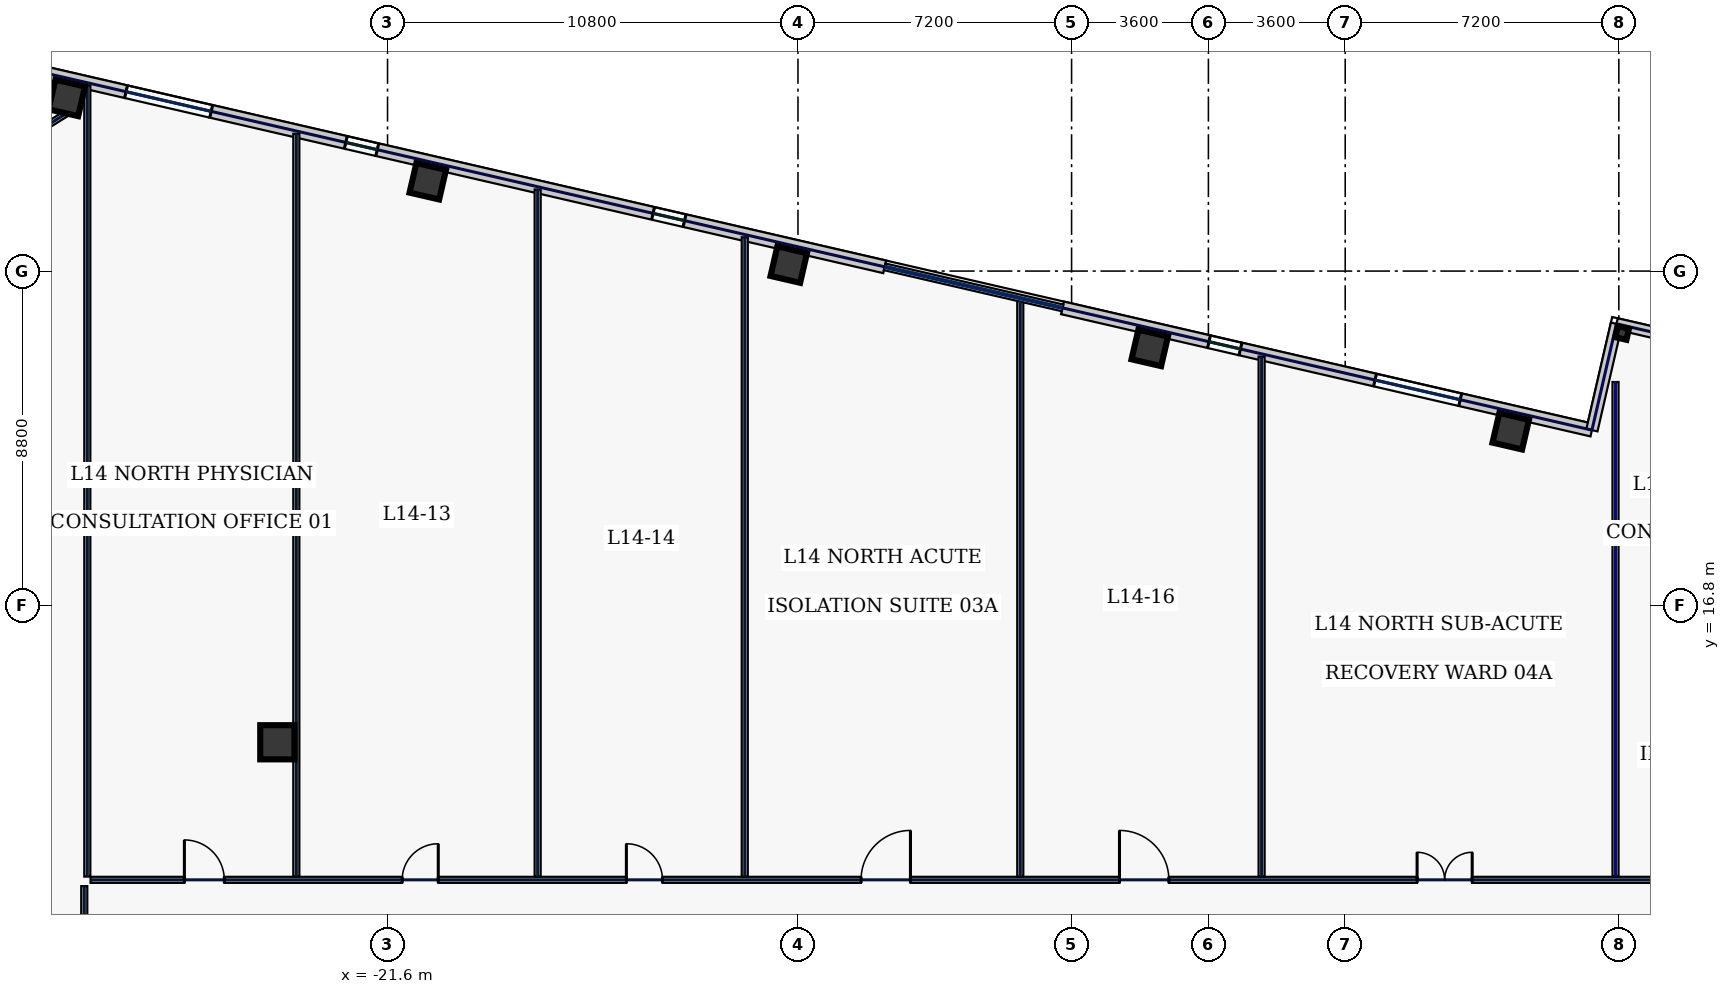
"""IFC4 building model, lengths in metres.
Left out: names, types, materials, properties, quantities, classifications, styles, units other than length and angle.
Written with IfcOpenShell. Run it as: python <this file> out.ifc"""

import sys

from ifc_helpers import new_model, si_unit, direction, frame, frame_2d, origin, origin_2d, place, context, subcontext, project, spatial, rectangle, hollow_rectangle, extrude, element, fill, save


model = new_model("IFC4")
c1 = context("Model", 3, precision=1e-05, world=origin(), true_north=direction((0.0, 1.0)))
c2 = subcontext(c1, "Body", "Model", "MODEL_VIEW")
j1 = project(units=[si_unit("LENGTHUNIT", "METRE"), si_unit("PLANEANGLEUNIT", "RADIAN")], contexts=[c1])
p1 = place(None, origin())
s1 = spatial("IfcSite", under=j1, at=p1, CompositionType="ELEMENT")
p2 = place(p1, origin())
s2 = spatial("IfcBuilding", under=s1, at=p2, CompositionType="ELEMENT")
p3 = place(p2, frame((0.0, 0.0, 67.4)))
s3 = spatial("IfcBuildingStorey", under=s2, at=p3, CompositionType="ELEMENT", Elevation=67.4)
p4 = place(p3, frame((-24.5, 13.2, 0.0), z_axis=(0.0, 0.0, 1.0), x_axis=(1.0, 0.0, 0.0)))
e1 = element("IfcColumn", 1, at=p4, inside=s3, PredefinedType="COLUMN", context=c2, shape_type="SweptSolid", body=[
    extrude(hollow_rectangle(XDim=0.9, YDim=0.9, WallThickness=0.04, at=origin_2d()), origin(), (0.0, 0.0, 1.0), 3.74),
])
for number, where, z_axis, x_axis in (
    (2, (7.955, 21.385, 0.0), (0.0, 0.0, 1.0), (0.974, -0.225, 0.0)),
    (3, (-1.544, 23.578, 0.0), (0.0, 0.0, 1.0), (0.974, -0.225, 0.0)),
    (4, (-11.042, 25.771, 0.0), (0.0, 0.0, 1.0), (0.974, -0.225, 0.0)),
    (5, (-20.541, 27.964, 0.0), (0.0, 0.0, 1.0), (0.974, -0.225, 0.0)),
    (6, (-30.04, 30.156, 0.0), (0.0, 0.0, 1.0), (0.974, -0.225, 0.0)),
):
    element("IfcColumn", number, at=place(p3, frame(where, z_axis=z_axis, x_axis=x_axis)), inside=s3, PredefinedType="COLUMN", context=c2, shape_type="SweptSolid", body=[
        extrude(hollow_rectangle(XDim=0.8, YDim=0.8, WallThickness=0.036, at=origin_2d()), origin(), (0.0, 0.0, 1.0), 3.74),
    ])
p5 = place(p3, frame((10.888, 23.971, 0.0), z_axis=(0.0, 0.0, 1.0), x_axis=(0.974370064785, -0.224951054344, 0.0)))
e7 = element("IfcColumn", 7, at=p5, inside=s3, PredefinedType="COLUMN", context=c2, shape_type="SweptSolid", body=[
    extrude(hollow_rectangle(XDim=0.3, YDim=0.3, WallThickness=0.016, at=origin_2d()), origin(), (0.0, 0.0, 1.0), 3.74),
])
p6 = place(p3, frame((10.092, 21.415, 0.0), z_axis=(0.0, 0.0, 1.0), x_axis=(-0.97436816851, 0.224959267855, 0.0)))
e8 = element("IfcWall", 8, at=p6, inside=s3, PredefinedType="STANDARD", context=c2, shape_type="SweptSolid", body=[
    extrude(rectangle(XDim=14.298, YDim=0.34, at=frame_2d((7.149, 0.0))), origin(), (0.0, 0.0, 1.0), 3.74),
])
p7 = place(p6, frame((9.492, 0.0, 0.77)))
e9 = element("IfcOpeningElement", 9, at=p7, cuts=e8, PredefinedType="OPENING", context=c2, shape_type="SweptSolid", body=[
    extrude(rectangle(XDim=0.85, YDim=1.85, at=frame_2d((0.425, 0.925))), frame((0.0, 0.18, 0.0), z_axis=(0.0, -1.0, 0.0), x_axis=(1.0, 0.0, 0.0)), (0.0, 0.0, 1.0), 0.36),
])
p8 = place(p6, frame((3.558, 0.0, 0.77)))
e10 = element("IfcOpeningElement", 10, at=p8, cuts=e8, PredefinedType="OPENING", context=c2, shape_type="SweptSolid", body=[
    extrude(rectangle(XDim=2.3, YDim=2.1, at=frame_2d((1.15, 1.05))), frame((0.0, 0.18, 0.0), z_axis=(0.0, -1.0, 0.0), x_axis=(1.0, 0.0, 0.0)), (0.0, 0.0, 1.0), 0.36),
])
p9 = place(p3, frame((-8.517, 25.711, 0.0), z_axis=(0.0, 0.0, 1.0), x_axis=(-0.974372845456, 0.224939009598, 0.0)))
e11 = element("IfcWall", 11, at=p9, inside=s3, PredefinedType="STANDARD", context=c2, shape_type="SweptSolid", body=[
    extrude(rectangle(XDim=22.652, YDim=0.34, at=frame_2d((11.326, 0.0))), origin(), (0.0, 0.0, 1.0), 3.74),
])
p10 = place(p9, frame((18.189, 0.0, 0.77)))
e12 = element("IfcOpeningElement", 12, at=p10, cuts=e11, PredefinedType="OPENING", context=c2, shape_type="SweptSolid", body=[
    extrude(rectangle(XDim=2.3, YDim=2.1, at=frame_2d((1.15, 1.05))), frame((0.0, 0.18, 0.0), z_axis=(0.0, -1.0, 0.0), x_axis=(1.0, 0.0, 0.0)), (0.0, 0.0, 1.0), 0.36),
])
p11 = place(p9, frame((13.705, 0.0, 0.77)))
e13 = element("IfcOpeningElement", 13, at=p11, cuts=e11, PredefinedType="OPENING", context=c2, shape_type="SweptSolid", body=[
    extrude(rectangle(XDim=0.85, YDim=1.85, at=frame_2d((0.425, 0.925))), frame((0.0, 0.18, 0.0), z_axis=(0.0, -1.0, 0.0), x_axis=(1.0, 0.0, 0.0)), (0.0, 0.0, 1.0), 0.36),
])
p12 = place(p9, frame((5.406, 0.0, 0.77)))
e14 = element("IfcOpeningElement", 14, at=p12, cuts=e11, PredefinedType="OPENING", context=c2, shape_type="SweptSolid", body=[
    extrude(rectangle(XDim=0.85, YDim=1.85, at=frame_2d((0.425, 0.925))), frame((0.0, 0.18, 0.0), z_axis=(0.0, -1.0, 0.0), x_axis=(1.0, 0.0, 0.0)), (0.0, 0.0, 1.0), 0.36),
])
p13 = place(p3, frame((10.092, 21.415, 0.0), z_axis=(0.0, 0.0, 1.0), x_axis=(0.225002397841, 0.97435820978, 0.0)))
e15 = element("IfcWall", 15, at=p13, inside=s3, PredefinedType="STANDARD", context=c2, shape_type="SweptSolid", body=[
    extrude(rectangle(XDim=2.87, YDim=0.3, at=frame_2d((1.435, 0.0))), origin(), (0.0, 0.0, 1.0), 1.535),
])
p14 = place(p3, frame((10.738, 24.211, 0.0), z_axis=(0.0, 0.0, 1.0), x_axis=(0.974371888243, -0.224943155936, 0.0)))
e16 = element("IfcWall", 16, at=p14, inside=s3, PredefinedType="STANDARD", context=c2, shape_type="SweptSolid", body=[
    extrude(rectangle(XDim=8.1, YDim=0.3, at=frame_2d((4.05, 0.0))), origin(), (0.0, 0.0, 1.0), 2.135),
])
p15 = place(p3, frame((-29.86, 29.868, 0.0), z_axis=(0.0, 0.0, 1.0), x_axis=(-0.848043064089, -0.529927317139, 0.0)))
e17 = element("IfcWall", 17, at=p15, inside=s3, PredefinedType="PARTITIONING", context=c2, shape_type="SweptSolid", body=[
    extrude(rectangle(XDim=7.354, YDim=0.16, at=frame_2d((3.677, 0.0))), origin(), (0.0, 0.0, 1.0), 3.74),
])
p16 = place(p3, frame((-29.58, -9.215, 0.0), z_axis=(0.0, 0.0, 1.0), x_axis=(0.0, 1.0, 0.0)))
e18 = element("IfcWall", 18, at=p16, inside=s3, PredefinedType="PARTITIONING", context=c2, shape_type="SweptSolid", body=[
    extrude(rectangle(XDim=18.63, YDim=0.16, at=frame_2d((9.315, 0.0))), origin(), (0.0, 0.0, 1.0), 3.74),
])
p17 = place(p16, frame((1.769, 0.0, 0.0)))
e19 = element("IfcOpeningElement", 19, at=p17, cuts=e18, PredefinedType="OPENING", context=c2, shape_type="SweptSolid", body=[
    extrude(rectangle(XDim=0.95, YDim=2.2, at=frame_2d((0.475, 1.1))), frame((0.0, 0.09, 0.0), z_axis=(0.0, -1.0, 0.0), x_axis=(1.0, 0.0, 0.0)), (0.0, 0.0, 1.0), 0.18),
])
p18 = place(p16, frame((6.85, 0.0, 0.0)))
e20 = element("IfcOpeningElement", 20, at=p18, cuts=e18, PredefinedType="OPENING", context=c2, shape_type="SweptSolid", body=[
    extrude(rectangle(XDim=0.95, YDim=2.2, at=frame_2d((0.475, 1.1))), frame((0.0, 0.09, 0.0), z_axis=(0.0, -1.0, 0.0), x_axis=(1.0, 0.0, 0.0)), (0.0, 0.0, 1.0), 0.18),
])
p19 = place(p16, frame((12.05, 0.0, 0.0)))
e21 = element("IfcOpeningElement", 21, at=p19, cuts=e18, PredefinedType="OPENING", context=c2, shape_type="SweptSolid", body=[
    extrude(rectangle(XDim=0.95, YDim=2.2, at=frame_2d((0.475, 1.1))), frame((0.0, 0.09, 0.0), z_axis=(0.0, -1.0, 0.0), x_axis=(1.0, 0.0, 0.0)), (0.0, 0.0, 1.0), 0.18),
])
p20 = place(p16, frame((15.981, 0.0, 0.0)))
e22 = element("IfcOpeningElement", 22, at=p20, cuts=e18, PredefinedType="OPENING", context=c2, shape_type="SweptSolid", body=[
    extrude(rectangle(XDim=0.95, YDim=2.2, at=frame_2d((0.475, 1.1))), frame((0.0, 0.09, 0.0), z_axis=(0.0, -1.0, 0.0), x_axis=(1.0, 0.0, 0.0)), (0.0, 0.0, 1.0), 0.18),
])
p21 = place(p3, frame((-29.415, 9.58, 0.0), z_axis=(0.0, 0.0, 1.0), x_axis=(1.0, 0.0, 0.0)))
e23 = element("IfcWall", 23, at=p21, inside=s3, PredefinedType="PARTITIONING", context=c2, shape_type="SweptSolid", body=[
    extrude(rectangle(XDim=43.65, YDim=0.16, at=frame_2d((21.825, 0.0))), origin(), (0.0, 0.0, 1.0), 3.74),
])
p22 = place(p21, frame((2.469, 0.0, 0.0)))
e24 = element("IfcOpeningElement", 24, at=p22, cuts=e23, PredefinedType="OPENING", context=c2, shape_type="SweptSolid", body=[
    extrude(rectangle(XDim=1.05, YDim=2.2, at=frame_2d((0.525, 1.1))), frame((0.0, 0.09, 0.0), z_axis=(0.0, -1.0, 0.0), x_axis=(1.0, 0.0, 0.0)), (0.0, 0.0, 1.0), 0.18),
])
p23 = place(p21, frame((8.2, 0.0, 0.0)))
e25 = element("IfcOpeningElement", 25, at=p23, cuts=e23, PredefinedType="OPENING", context=c2, shape_type="SweptSolid", body=[
    extrude(rectangle(XDim=0.95, YDim=2.2, at=frame_2d((0.475, 1.1))), frame((0.0, 0.09, 0.0), z_axis=(0.0, -1.0, 0.0), x_axis=(1.0, 0.0, 0.0)), (0.0, 0.0, 1.0), 0.18),
])
p24 = place(p21, frame((14.1, 0.0, 0.0)))
e26 = element("IfcOpeningElement", 26, at=p24, cuts=e23, PredefinedType="OPENING", context=c2, shape_type="SweptSolid", body=[
    extrude(rectangle(XDim=0.95, YDim=2.2, at=frame_2d((0.475, 1.1))), frame((0.0, 0.09, 0.0), z_axis=(0.0, -1.0, 0.0), x_axis=(1.0, 0.0, 0.0)), (0.0, 0.0, 1.0), 0.18),
])
p25 = place(p21, frame((20.275, 0.0, 0.0)))
e27 = element("IfcOpeningElement", 27, at=p25, cuts=e23, PredefinedType="OPENING", context=c2, shape_type="SweptSolid", body=[
    extrude(rectangle(XDim=1.3, YDim=2.2, at=frame_2d((0.65, 1.1))), frame((0.0, 0.09, 0.0), z_axis=(0.0, -1.0, 0.0), x_axis=(1.0, 0.0, 0.0)), (0.0, 0.0, 1.0), 0.18),
])
p26 = place(p21, frame((27.075, 0.0, 0.0)))
e28 = element("IfcOpeningElement", 28, at=p26, cuts=e23, PredefinedType="OPENING", context=c2, shape_type="SweptSolid", body=[
    extrude(rectangle(XDim=1.3, YDim=2.2, at=frame_2d((0.65, 1.1))), frame((0.0, 0.09, 0.0), z_axis=(0.0, -1.0, 0.0), x_axis=(1.0, 0.0, 0.0)), (0.0, 0.0, 1.0), 0.18),
])
p27 = place(p21, frame((34.906, 0.0, 0.0)))
e29 = element("IfcOpeningElement", 29, at=p27, cuts=e23, PredefinedType="OPENING", context=c2, shape_type="SweptSolid", body=[
    extrude(rectangle(XDim=1.45, YDim=2.2, at=frame_2d((0.725, 1.1))), frame((0.0, 0.09, 0.0), z_axis=(0.0, -1.0, 0.0), x_axis=(1.0, 0.0, 0.0)), (0.0, 0.0, 1.0), 0.18),
])
p28 = place(p3, frame((-29.5, 9.665, 0.0), z_axis=(0.0, 0.0, 1.0), x_axis=(0.0, 1.0, 0.0)))
e30 = element("IfcWall", 30, at=p28, inside=s3, PredefinedType="PARTITIONING", context=c2, shape_type="SweptSolid", body=[
    extrude(rectangle(XDim=20.819, YDim=0.16, at=frame_2d((10.409, 0.0))), origin(), (0.0, 0.0, 1.0), 3.74),
])
p29 = place(p3, frame((-24.0, 9.665, 0.0), z_axis=(0.0, 0.0, 1.0), x_axis=(0.0, 1.0, 0.0)))
e31 = element("IfcWall", 31, at=p29, inside=s3, PredefinedType="PARTITIONING", context=c2, shape_type="SweptSolid", body=[
    extrude(rectangle(XDim=19.549, YDim=0.16, at=frame_2d((9.774, 0.0))), origin(), (0.0, 0.0, 1.0), 3.235),
])
p30 = place(p3, frame((-12.2, 9.665, 0.0), z_axis=(0.0, 0.0, 1.0), x_axis=(0.0, 1.0, 0.0)))
e32 = element("IfcWall", 32, at=p30, inside=s3, PredefinedType="PARTITIONING", context=c2, shape_type="SweptSolid", body=[
    extrude(rectangle(XDim=16.824, YDim=0.16, at=frame_2d((8.412, 0.0))), origin(), (0.0, 0.0, 1.0), 3.74),
])
p31 = place(p3, frame((1.4, 9.665, 0.0), z_axis=(0.0, 0.0, 1.0), x_axis=(0.0, 1.0, 0.0)))
e33 = element("IfcWall", 33, at=p31, inside=s3, PredefinedType="PARTITIONING", context=c2, shape_type="SweptSolid", body=[
    extrude(rectangle(XDim=13.685, YDim=0.16, at=frame_2d((6.842, 0.0))), origin(), (0.0, 0.0, 1.0), 3.74),
])
p32 = place(p3, frame((-17.65, 9.665, 0.0), z_axis=(0.0, 0.0, 1.0), x_axis=(0.0, 1.0, 0.0)))
e34 = element("IfcWall", 34, at=p32, inside=s3, PredefinedType="PARTITIONING", context=c2, shape_type="SweptSolid", body=[
    extrude(rectangle(XDim=18.083, YDim=0.16, at=frame_2d((9.042, 0.0))), origin(), (0.0, 0.0, 1.0), 3.74),
])
p33 = place(p3, frame((-4.95, 9.665, 0.0), z_axis=(0.0, 0.0, 1.0), x_axis=(0.0, 1.0, 0.0)))
e35 = element("IfcWall", 35, at=p33, inside=s3, PredefinedType="PARTITIONING", context=c2, shape_type="SweptSolid", body=[
    extrude(rectangle(XDim=15.151, YDim=0.16, at=frame_2d((7.575, 0.0))), origin(), (0.0, 0.0, 1.0), 3.74),
])
p34 = place(p3, frame((10.713, 9.665, 0.0), z_axis=(0.0, 0.0, 1.0), x_axis=(0.0, 1.0, 0.0)))
e36 = element("IfcWall", 36, at=p34, inside=s3, PredefinedType="PARTITIONING", context=c2, shape_type="SweptSolid", body=[
    extrude(rectangle(XDim=13.015, YDim=0.16, at=frame_2d((6.508, 0.0))), origin(), (0.0, 0.0, 1.0), 1.535),
])
p35 = place(p7, origin())
e37 = element("IfcWindow", 37, at=p35, inside=s3, PartitioningType="SINGLE_PANEL", PredefinedType="WINDOW", context=c2, shape_type="SweptSolid", body=[
    extrude(rectangle(XDim=0.85, YDim=1.85, at=frame_2d((0.425, 0.925))), frame((0.0, 0.03, 0.0), z_axis=(0.0, -1.0, 0.0), x_axis=(1.0, 0.0, 0.0)), (0.0, 0.0, 1.0), 0.06),
])
fill(e9, e37)
p36 = place(p8, origin())
e38 = element("IfcWindow", 38, at=p36, inside=s3, PartitioningType="SINGLE_PANEL", PredefinedType="WINDOW", context=c2, shape_type="SweptSolid", body=[
    extrude(rectangle(XDim=2.3, YDim=2.1, at=frame_2d((1.15, 1.05))), frame((0.0, 0.03, 0.0), z_axis=(0.0, -1.0, 0.0), x_axis=(1.0, 0.0, 0.0)), (0.0, 0.0, 1.0), 0.06),
])
fill(e10, e38)
p37 = place(p10, origin())
e39 = element("IfcWindow", 39, at=p37, inside=s3, PartitioningType="SINGLE_PANEL", PredefinedType="WINDOW", context=c2, shape_type="SweptSolid", body=[
    extrude(rectangle(XDim=2.3, YDim=2.1, at=frame_2d((1.15, 1.05))), frame((0.0, 0.03, 0.0), z_axis=(0.0, -1.0, 0.0), x_axis=(1.0, 0.0, 0.0)), (0.0, 0.0, 1.0), 0.06),
])
fill(e12, e39)
p38 = place(p11, origin())
e40 = element("IfcWindow", 40, at=p38, inside=s3, PartitioningType="SINGLE_PANEL", PredefinedType="WINDOW", context=c2, shape_type="SweptSolid", body=[
    extrude(rectangle(XDim=0.85, YDim=1.85, at=frame_2d((0.425, 0.925))), frame((0.0, 0.03, 0.0), z_axis=(0.0, -1.0, 0.0), x_axis=(1.0, 0.0, 0.0)), (0.0, 0.0, 1.0), 0.06),
])
fill(e13, e40)
p39 = place(p12, origin())
e41 = element("IfcWindow", 41, at=p39, inside=s3, PartitioningType="SINGLE_PANEL", PredefinedType="WINDOW", context=c2, shape_type="SweptSolid", body=[
    extrude(rectangle(XDim=0.85, YDim=1.85, at=frame_2d((0.425, 0.925))), frame((0.0, 0.03, 0.0), z_axis=(0.0, -1.0, 0.0), x_axis=(1.0, 0.0, 0.0)), (0.0, 0.0, 1.0), 0.06),
])
fill(e14, e41)
p40 = place(p22, origin())
e42 = element("IfcDoor", 42, at=p40, inside=s3, OperationType="SINGLE_SWING_LEFT", PredefinedType="DOOR", context=c2, shape_type="SweptSolid", body=[
    extrude(rectangle(XDim=1.05, YDim=2.2, at=frame_2d((0.525, 1.1))), frame((0.0, 0.025, 0.0), z_axis=(0.0, -1.0, 0.0), x_axis=(1.0, 0.0, 0.0)), (0.0, 0.0, 1.0), 0.05),
])
fill(e24, e42)
p41 = place(p23, origin())
e43 = element("IfcDoor", 43, at=p41, inside=s3, OperationType="SINGLE_SWING_RIGHT", PredefinedType="DOOR", context=c2, shape_type="SweptSolid", body=[
    extrude(rectangle(XDim=0.95, YDim=2.2, at=frame_2d((0.475, 1.1))), frame((0.0, 0.025, 0.0), z_axis=(0.0, -1.0, 0.0), x_axis=(1.0, 0.0, 0.0)), (0.0, 0.0, 1.0), 0.05),
])
fill(e25, e43)
p42 = place(p24, origin())
e44 = element("IfcDoor", 44, at=p42, inside=s3, OperationType="SINGLE_SWING_LEFT", PredefinedType="DOOR", context=c2, shape_type="SweptSolid", body=[
    extrude(rectangle(XDim=0.95, YDim=2.2, at=frame_2d((0.475, 1.1))), frame((0.0, 0.025, 0.0), z_axis=(0.0, -1.0, 0.0), x_axis=(1.0, 0.0, 0.0)), (0.0, 0.0, 1.0), 0.05),
])
fill(e26, e44)
p43 = place(p25, origin())
e45 = element("IfcDoor", 45, at=p43, inside=s3, OperationType="SINGLE_SWING_RIGHT", PredefinedType="DOOR", context=c2, shape_type="SweptSolid", body=[
    extrude(rectangle(XDim=1.3, YDim=2.2, at=frame_2d((0.65, 1.1))), frame((0.0, 0.025, 0.0), z_axis=(0.0, -1.0, 0.0), x_axis=(1.0, 0.0, 0.0)), (0.0, 0.0, 1.0), 0.05),
])
fill(e27, e45)
p44 = place(p26, origin())
e46 = element("IfcDoor", 46, at=p44, inside=s3, OperationType="SINGLE_SWING_LEFT", PredefinedType="DOOR", context=c2, shape_type="SweptSolid", body=[
    extrude(rectangle(XDim=1.3, YDim=2.2, at=frame_2d((0.65, 1.1))), frame((0.0, 0.025, 0.0), z_axis=(0.0, -1.0, 0.0), x_axis=(1.0, 0.0, 0.0)), (0.0, 0.0, 1.0), 0.05),
])
fill(e28, e46)
p45 = place(p27, origin())
e47 = element("IfcDoor", 47, at=p45, inside=s3, OperationType="DOUBLE_SWING_LEFT", PredefinedType="DOOR", context=c2, shape_type="SweptSolid", body=[
    extrude(rectangle(XDim=1.45, YDim=2.2, at=frame_2d((0.725, 1.1))), frame((0.0, 0.025, 0.0), z_axis=(0.0, -1.0, 0.0), x_axis=(1.0, 0.0, 0.0)), (0.0, 0.0, 1.0), 0.05),
])
fill(e29, e47)
save(model, sys.argv[1])
